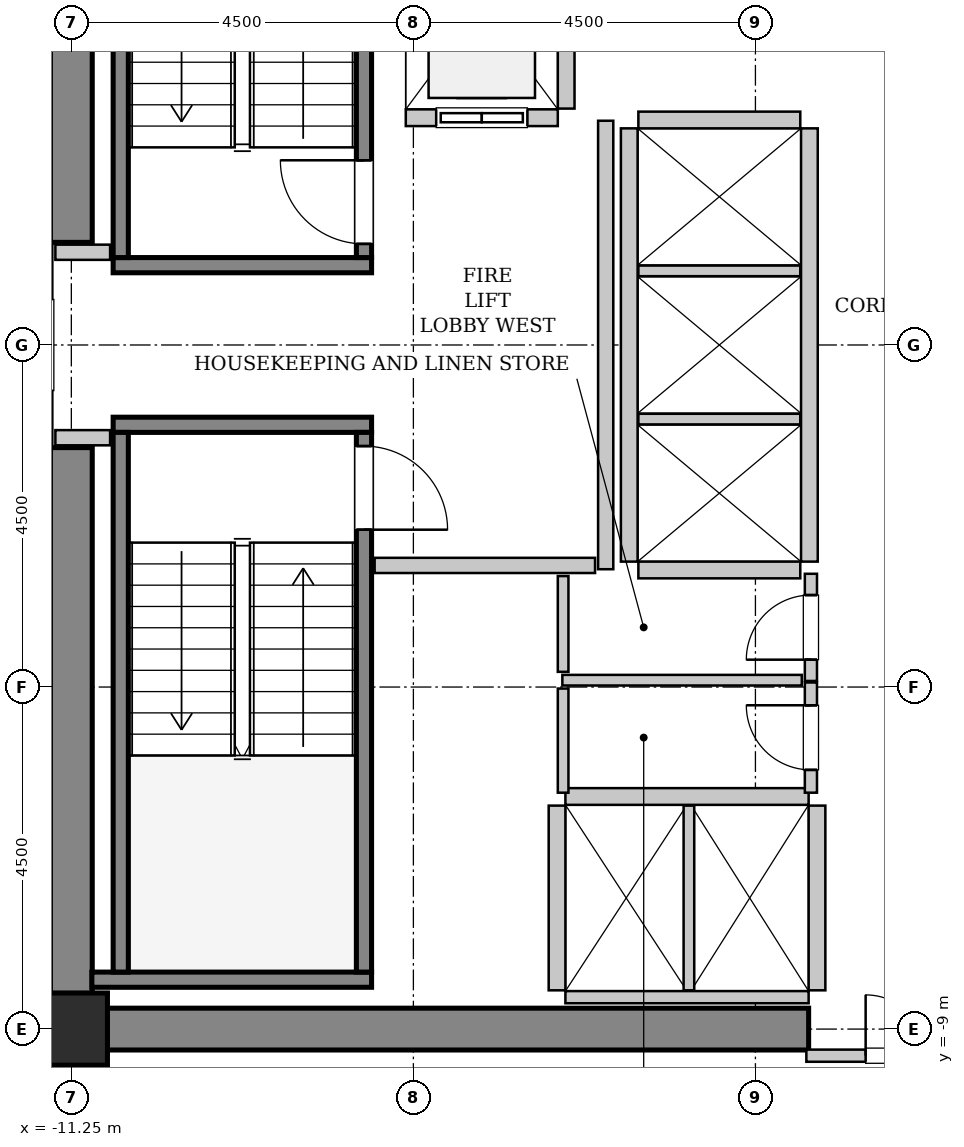
"""IFC4 building model, lengths in metres.
Left out: names, types, materials, properties, quantities, classifications, styles, units other than length and angle.
Written with IfcOpenShell. Run it as: python <this file> out.ifc"""

import sys

from ifc_helpers import new_model, si_unit, direction, frame, frame_2d, origin, origin_2d, place, context, subcontext, project, spatial, rectangle, hollow_rectangle, extrude, source, transform, mapped, element, fill, save


model = new_model("IFC4")
c1 = context("Model", 3, precision=1e-05, world=origin(), true_north=direction((0.0, 1.0)))
c2 = subcontext(c1, "Body", "Model", "MODEL_VIEW")
j1 = project(units=[si_unit("LENGTHUNIT", "METRE"), si_unit("PLANEANGLEUNIT", "RADIAN")], contexts=[c1])
p1 = place(None, origin())
s1 = spatial("IfcSite", under=j1, at=p1, CompositionType="ELEMENT")
p2 = place(p1, origin())
s2 = spatial("IfcBuilding", under=s1, at=p2, CompositionType="ELEMENT")
p3 = place(p2, frame((0.0, 0.0, 125.0)))
s3 = spatial("IfcBuildingStorey", under=s2, at=p3, CompositionType="ELEMENT", Elevation=125.0)
m1 = source(origin(), c2, "Body", "SweptSolid", [
    extrude(rectangle(XDim=9.975, YDim=0.55, at=frame_2d((4.987, 0.0))), origin(), (0.0, 0.0, 1.0), 3.8),
])
p4 = place(p3, frame((-11.525, -9.0, 0.0), z_axis=(0.0, 0.0, 1.0), x_axis=(1.0, 0.0, 0.0)))
e1 = element("IfcWall", 1, at=p4, inside=s3, PredefinedType="SHEAR", context=c2, shape_type="MappedRepresentation", body=[
    mapped(m1, transform((0.0, 0.0, 0.0), x_axis=(1.0, 0.0, 0.0), y_axis=(0.0, 1.0, 0.0), z_axis=(0.0, 0.0, 1.0), scale=1.0)),
])
m2 = source(origin(), c2, "Body", "SweptSolid", [
    extrude(rectangle(XDim=7.375, YDim=0.55, at=frame_2d((3.688, 0.0))), origin(), (0.0, 0.0, 1.0), 3.8),
])
for number, where, z_axis, x_axis in (
    (2, (-11.25, -8.725, 0.0), (0.0, 0.0, 1.0), (0.0, 1.0, 0.0)),
    (3, (-11.25, 1.35, 0.0), (0.0, 0.0, 1.0), (0.0, 1.0, 0.0)),
):
    element("IfcWall", number, at=place(p3, frame(where, z_axis=z_axis, x_axis=x_axis)), inside=s3, PredefinedType="SHEAR", context=c2, shape_type="MappedRepresentation", body=[
        mapped(m2, transform((0.0, 0.0, 0.0), x_axis=(1.0, 0.0, 0.0), y_axis=(0.0, 1.0, 0.0), z_axis=(0.0, 0.0, 1.0), scale=1.0)),
    ])
m3 = source(origin(), c2, "Body", "SweptSolid", [
    extrude(hollow_rectangle(XDim=0.95, YDim=0.95, WallThickness=0.045, InnerFilletRadius=0.045, OuterFilletRadius=0.09, at=origin_2d()), origin(), (0.0, 0.0, 1.0), 3.8),
])
p5 = place(p3, frame((-11.25, -9.0, 0.0), z_axis=(0.0, 0.0, 1.0), x_axis=(1.0, 0.0, 0.0)))
e4 = element("IfcColumn", 4, at=p5, inside=s3, PredefinedType="COLUMN", context=c2, shape_type="MappedRepresentation", body=[
    mapped(m3, transform((0.0, 0.0, 0.0), x_axis=(1.0, 0.0, 0.0), y_axis=(0.0, 1.0, 0.0), z_axis=(0.0, 0.0, 1.0), scale=1.0)),
])
m4 = source(origin(), c2, "Body", "SweptSolid", [
    extrude(rectangle(XDim=3.4, YDim=0.2, at=frame_2d((1.7, 0.0))), origin(), (0.0, 0.0, 1.0), 3.8),
])
p6 = place(p3, frame((-7.3, 1.05, 0.0), z_axis=(0.0, 0.0, 1.0), x_axis=(-1.0, 0.0, 0.0)))
e5 = element("IfcWall", 5, at=p6, inside=s3, PredefinedType="SOLIDWALL", context=c2, shape_type="MappedRepresentation", body=[
    mapped(m4, transform((0.0, 0.0, 0.0), x_axis=(1.0, 0.0, 0.0), y_axis=(0.0, 1.0, 0.0), z_axis=(0.0, 0.0, 1.0), scale=1.0)),
])
m5 = source(origin(), c2, "Body", "SweptSolid", [
    extrude(rectangle(XDim=7.1, YDim=0.2, at=frame_2d((3.55, 0.0))), origin(), (0.0, 0.0, 1.0), 3.8),
])
p7 = place(p3, frame((-7.4, 1.15, 0.0), z_axis=(0.0, 0.0, 1.0), x_axis=(0.0, 1.0, 0.0)))
e6 = element("IfcWall", 6, at=p7, inside=s3, PredefinedType="SOLIDWALL", context=c2, shape_type="MappedRepresentation", body=[
    mapped(m5, transform((0.0, 0.0, 0.0), x_axis=(1.0, 0.0, 0.0), y_axis=(0.0, 1.0, 0.0), z_axis=(0.0, 0.0, 1.0), scale=1.0)),
])
p8 = place(p7, frame((0.18, 0.0, 0.0)))
e7 = element("IfcOpeningElement", 7, at=p8, cuts=e6, PredefinedType="OPENING", context=c2, shape_type="SweptSolid", body=[
    extrude(rectangle(XDim=1.1, YDim=2.15, at=frame_2d((0.55, 1.075))), frame((0.0, 0.11, 0.0), z_axis=(0.0, -1.0, 0.0), x_axis=(1.0, 0.0, 0.0)), (0.0, 0.0, 1.0), 0.22),
])
p9 = place(p3, frame((-10.6, 1.15, 0.0), z_axis=(0.0, 0.0, 1.0), x_axis=(0.0, 1.0, 0.0)))
e8 = element("IfcWall", 8, at=p9, inside=s3, PredefinedType="SOLIDWALL", context=c2, shape_type="MappedRepresentation", body=[
    mapped(m5, transform((0.0, 0.0, 0.0), x_axis=(1.0, 0.0, 0.0), y_axis=(0.0, 1.0, 0.0), z_axis=(0.0, 0.0, 1.0), scale=1.0)),
])
p10 = place(p3, frame((-10.7, -1.05, 0.0), z_axis=(0.0, 0.0, 1.0), x_axis=(1.0, 0.0, 0.0)))
e9 = element("IfcWall", 9, at=p10, inside=s3, PredefinedType="SOLIDWALL", context=c2, shape_type="MappedRepresentation", body=[
    mapped(m4, transform((0.0, 0.0, 0.0), x_axis=(1.0, 0.0, 0.0), y_axis=(0.0, 1.0, 0.0), z_axis=(0.0, 0.0, 1.0), scale=1.0)),
])
m6 = source(origin(), c2, "Body", "SweptSolid", [
    extrude(rectangle(XDim=3.68, YDim=0.2, at=frame_2d((1.84, 0.0))), origin(), (0.0, 0.0, 1.0), 3.8),
])
p11 = place(p3, frame((-10.98, -8.35, 0.0), z_axis=(0.0, 0.0, 1.0), x_axis=(1.0, 0.0, 0.0)))
e10 = element("IfcWall", 10, at=p11, inside=s3, PredefinedType="SOLIDWALL", context=c2, shape_type="MappedRepresentation", body=[
    mapped(m6, transform((0.0, 0.0, 0.0), x_axis=(1.0, 0.0, 0.0), y_axis=(0.0, 1.0, 0.0), z_axis=(0.0, 0.0, 1.0), scale=1.0)),
])
p12 = place(p3, frame((-10.6, -1.15, 0.0), z_axis=(0.0, 0.0, 1.0), x_axis=(0.0, -1.0, 0.0)))
e11 = element("IfcWall", 11, at=p12, inside=s3, PredefinedType="SOLIDWALL", context=c2, shape_type="MappedRepresentation", body=[
    mapped(m5, transform((0.0, 0.0, 0.0), x_axis=(1.0, 0.0, 0.0), y_axis=(0.0, 1.0, 0.0), z_axis=(0.0, 0.0, 1.0), scale=1.0)),
])
p13 = place(p3, frame((-7.4, -1.15, 0.0), z_axis=(0.0, 0.0, 1.0), x_axis=(0.0, -1.0, 0.0)))
e12 = element("IfcWall", 12, at=p13, inside=s3, PredefinedType="SOLIDWALL", context=c2, shape_type="MappedRepresentation", body=[
    mapped(m5, transform((0.0, 0.0, 0.0), x_axis=(1.0, 0.0, 0.0), y_axis=(0.0, 1.0, 0.0), z_axis=(0.0, 0.0, 1.0), scale=1.0)),
])
p14 = place(p13, frame((0.18, 0.0, 0.0)))
e13 = element("IfcOpeningElement", 13, at=p14, cuts=e12, PredefinedType="OPENING", context=c2, shape_type="SweptSolid", body=[
    extrude(rectangle(XDim=1.1, YDim=2.15, at=frame_2d((0.55, 1.075))), frame((0.0, 0.11, 0.0), z_axis=(0.0, -1.0, 0.0), x_axis=(1.0, 0.0, 0.0)), (0.0, 0.0, 1.0), 0.22),
])
m7 = source(origin(), c2, "Body", "SweptSolid", [
    extrude(rectangle(XDim=2.0, YDim=0.22, at=frame_2d((1.0, 0.0))), origin(), (0.0, 0.0, 1.0), 3.535),
])
p15 = place(p3, frame((-6.85, 2.99, 0.0), z_axis=(0.0, 0.0, 1.0), x_axis=(1.0, 0.0, 0.0)))
e14 = element("IfcWall", 14, at=p15, inside=s3, PredefinedType="SOLIDWALL", context=c2, shape_type="MappedRepresentation", body=[
    mapped(m7, transform((0.0, 0.0, 0.0), x_axis=(1.0, 0.0, 0.0), y_axis=(0.0, 1.0, 0.0), z_axis=(0.0, 0.0, 1.0), scale=1.0)),
])
p16 = place(p15, frame((0.4, 0.0, 0.0)))
e15 = element("IfcOpeningElement", 15, at=p16, cuts=e14, PredefinedType="OPENING", context=c2, shape_type="SweptSolid", body=[
    extrude(rectangle(XDim=1.2, YDim=2.2, at=frame_2d((0.6, 1.1))), frame((0.0, 0.12, 0.0), z_axis=(0.0, -1.0, 0.0), x_axis=(1.0, 0.0, 0.0)), (0.0, 0.0, 1.0), 0.24),
])
m8 = source(origin(), c2, "Body", "SweptSolid", [
    extrude(rectangle(XDim=2.68, YDim=0.22, at=frame_2d((1.34, 0.0))), origin(), (0.0, 0.0, 1.0), 3.535),
])
p17 = place(p3, frame((-4.74, 3.11, 0.0), z_axis=(0.0, 0.0, 1.0), x_axis=(0.0, 1.0, 0.0)))
e16 = element("IfcWall", 16, at=p17, inside=s3, PredefinedType="SOLIDWALL", context=c2, shape_type="MappedRepresentation", body=[
    mapped(m8, transform((0.0, 0.0, 0.0), x_axis=(1.0, 0.0, 0.0), y_axis=(0.0, 1.0, 0.0), z_axis=(0.0, 0.0, 1.0), scale=1.0)),
])
m9 = source(origin(), c2, "Body", "SweptSolid", [
    extrude(rectangle(XDim=3.2, YDim=0.22, at=frame_2d((1.6, 0.0))), origin(), (0.0, 0.0, 1.0), 3.535),
])
p18 = place(p3, frame((-1.55, -5.94, 0.0), z_axis=(0.0, 0.0, 1.0), x_axis=(-1.0, 0.0, 0.0)))
e17 = element("IfcWall", 17, at=p18, inside=s3, PredefinedType="SOLIDWALL", context=c2, shape_type="MappedRepresentation", body=[
    mapped(m9, transform((0.0, 0.0, 0.0), x_axis=(1.0, 0.0, 0.0), y_axis=(0.0, 1.0, 0.0), z_axis=(0.0, 0.0, 1.0), scale=1.0)),
])
m10 = source(origin(), c2, "Body", "SweptSolid", [
    extrude(rectangle(XDim=3.2, YDim=0.16, at=frame_2d((1.6, 0.0))), origin(), (0.0, 0.0, 1.0), 2.425),
])
p19 = place(p3, frame((-4.75, -8.58, 0.0), z_axis=(0.0, 0.0, 1.0), x_axis=(1.0, 0.0, 0.0)))
e18 = element("IfcWall", 18, at=p19, inside=s3, PredefinedType="PARTITIONING", context=c2, shape_type="MappedRepresentation", body=[
    mapped(m10, transform((0.0, 0.0, 0.0), x_axis=(1.0, 0.0, 0.0), y_axis=(0.0, 1.0, 0.0), z_axis=(0.0, 0.0, 1.0), scale=1.0)),
])
m11 = source(origin(), c2, "Body", "SweptSolid", [
    extrude(rectangle(XDim=2.43, YDim=0.22, at=frame_2d((1.215, 0.0))), origin(), (0.0, 0.0, 1.0), 3.535),
])
p20 = place(p3, frame((-4.86, -6.06, 0.0), z_axis=(0.0, 0.0, 1.0), x_axis=(0.0, -1.0, 0.0)))
e19 = element("IfcWall", 19, at=p20, inside=s3, PredefinedType="SOLIDWALL", context=c2, shape_type="MappedRepresentation", body=[
    mapped(m11, transform((0.0, 0.0, 0.0), x_axis=(1.0, 0.0, 0.0), y_axis=(0.0, 1.0, 0.0), z_axis=(0.0, 0.0, 1.0), scale=1.0)),
])
m12 = source(origin(), c2, "Body", "SweptSolid", [
    extrude(rectangle(XDim=2.43, YDim=0.14, at=frame_2d((1.215, 0.0))), origin(), (0.0, 0.0, 1.0), 3.535),
])
p21 = place(p3, frame((-3.125, -8.49, 0.0), z_axis=(0.0, 0.0, 1.0), x_axis=(0.0, 1.0, 0.0)))
e20 = element("IfcWall", 20, at=p21, inside=s3, PredefinedType="PARTITIONING", context=c2, shape_type="MappedRepresentation", body=[
    mapped(m12, transform((0.0, 0.0, 0.0), x_axis=(1.0, 0.0, 0.0), y_axis=(0.0, 1.0, 0.0), z_axis=(0.0, 0.0, 1.0), scale=1.0)),
])
p22 = place(p3, frame((-1.44, -8.49, 0.0), z_axis=(0.0, 0.0, 1.0), x_axis=(0.0, 1.0, 0.0)))
e21 = element("IfcWall", 21, at=p22, inside=s3, PredefinedType="SOLIDWALL", context=c2, shape_type="MappedRepresentation", body=[
    mapped(m11, transform((0.0, 0.0, 0.0), x_axis=(1.0, 0.0, 0.0), y_axis=(0.0, 1.0, 0.0), z_axis=(0.0, 0.0, 1.0), scale=1.0)),
])
m13 = source(origin(), c2, "Body", "SweptSolid", [
    extrude(rectangle(XDim=5.7, YDim=0.22, at=frame_2d((2.85, 0.0))), origin(), (0.0, 0.0, 1.0), 3.535),
])
for number, where, z_axis, x_axis in (
    (22, (-1.54, -2.85, 0.0), (0.0, 0.0, 1.0), (0.0, 1.0, 0.0)),
    (23, (-3.91, 2.85, 0.0), (0.0, 0.0, 1.0), (0.0, -1.0, 0.0)),
):
    element("IfcWall", number, at=place(p3, frame(where, z_axis=z_axis, x_axis=x_axis)), inside=s3, PredefinedType="SOLIDWALL", context=c2, shape_type="MappedRepresentation", body=[
        mapped(m13, transform((0.0, 0.0, 0.0), x_axis=(1.0, 0.0, 0.0), y_axis=(0.0, 1.0, 0.0), z_axis=(0.0, 0.0, 1.0), scale=1.0)),
    ])
m14 = source(origin(), c2, "Body", "SweptSolid", [
    extrude(rectangle(XDim=2.13, YDim=0.22, at=frame_2d((1.065, 0.0))), origin(), (0.0, 0.0, 1.0), 3.535),
])
p23 = place(p3, frame((-3.79, -2.96, 0.0), z_axis=(0.0, 0.0, 1.0), x_axis=(1.0, 0.0, 0.0)))
e24 = element("IfcWall", 24, at=p23, inside=s3, PredefinedType="SOLIDWALL", context=c2, shape_type="MappedRepresentation", body=[
    mapped(m14, transform((0.0, 0.0, 0.0), x_axis=(1.0, 0.0, 0.0), y_axis=(0.0, 1.0, 0.0), z_axis=(0.0, 0.0, 1.0), scale=1.0)),
])
m15 = source(origin(), c2, "Body", "SweptSolid", [
    extrude(rectangle(XDim=2.13, YDim=0.14, at=frame_2d((1.065, 0.0))), origin(), (0.0, 0.0, 1.0), 3.535),
])
for number, where, z_axis, x_axis in (
    (25, (-3.79, -0.975, 0.0), (0.0, 0.0, 1.0), (1.0, 0.0, 0.0)),
    (26, (-3.79, 0.975, 0.0), (0.0, 0.0, 1.0), (1.0, 0.0, 0.0)),
):
    element("IfcWall", number, at=place(p3, frame(where, z_axis=z_axis, x_axis=x_axis)), inside=s3, PredefinedType="PARTITIONING", context=c2, shape_type="MappedRepresentation", body=[
        mapped(m15, transform((0.0, 0.0, 0.0), x_axis=(1.0, 0.0, 0.0), y_axis=(0.0, 1.0, 0.0), z_axis=(0.0, 0.0, 1.0), scale=1.0)),
    ])
p24 = place(p3, frame((-1.66, 2.96, 0.0), z_axis=(0.0, 0.0, 1.0), x_axis=(-1.0, 0.0, 0.0)))
e27 = element("IfcWall", 27, at=p24, inside=s3, PredefinedType="SOLIDWALL", context=c2, shape_type="MappedRepresentation", body=[
    mapped(m14, transform((0.0, 0.0, 0.0), x_axis=(1.0, 0.0, 0.0), y_axis=(0.0, 1.0, 0.0), z_axis=(0.0, 0.0, 1.0), scale=1.0)),
])
m16 = source(origin(), c2, "Body", "SweptSolid", [
    extrude(rectangle(XDim=5.9, YDim=0.2, at=frame_2d((2.95, 0.0))), origin(), (0.0, 0.0, 1.0), 3.535),
])
p25 = place(p3, frame((-4.22, -2.95, 0.0), z_axis=(0.0, 0.0, 1.0), x_axis=(0.0, 1.0, 0.0)))
e28 = element("IfcWall", 28, at=p25, inside=s3, PredefinedType="PARTITIONING", context=c2, shape_type="MappedRepresentation", body=[
    mapped(m16, transform((0.0, 0.0, 0.0), x_axis=(1.0, 0.0, 0.0), y_axis=(0.0, 1.0, 0.0), z_axis=(0.0, 0.0, 1.0), scale=1.0)),
])
m17 = source(origin(), c2, "Body", "SweptSolid", [
    extrude(rectangle(XDim=2.9, YDim=0.2, at=frame_2d((1.45, 0.0))), origin(), (0.0, 0.0, 1.0), 3.535),
])
p26 = place(p3, frame((-7.26, -2.9, 0.0), z_axis=(0.0, 0.0, 1.0), x_axis=(1.0, 0.0, 0.0)))
e29 = element("IfcWall", 29, at=p26, inside=s3, PredefinedType="PARTITIONING", context=c2, shape_type="MappedRepresentation", body=[
    mapped(m17, transform((0.0, 0.0, 0.0), x_axis=(1.0, 0.0, 0.0), y_axis=(0.0, 1.0, 0.0), z_axis=(0.0, 0.0, 1.0), scale=1.0)),
])
m18 = source(origin(), c2, "Body", "SweptSolid", [
    extrude(rectangle(XDim=0.72, YDim=0.2, at=frame_2d((0.36, 0.0))), origin(), (0.0, 0.0, 1.0), 3.535),
])
for number, where, z_axis, x_axis in (
    (30, (-11.46, 1.22, 0.0), (0.0, 0.0, 1.0), (1.0, 0.0, 0.0)),
    (31, (-11.46, -1.22, 0.0), (0.0, 0.0, 1.0), (1.0, 0.0, 0.0)),
):
    element("IfcWall", number, at=place(p3, frame(where, z_axis=z_axis, x_axis=x_axis)), inside=s3, PredefinedType="PARTITIONING", context=c2, shape_type="MappedRepresentation", body=[
        mapped(m18, transform((0.0, 0.0, 0.0), x_axis=(1.0, 0.0, 0.0), y_axis=(0.0, 1.0, 0.0), z_axis=(0.0, 0.0, 1.0), scale=1.0)),
    ])
m19 = source(origin(), c2, "Body", "SweptSolid", [
    extrude(rectangle(XDim=3.16, YDim=0.16, at=frame_2d((1.58, 0.0))), origin(), (0.0, 0.0, 1.0), 2.425),
])
p27 = place(p3, frame((-1.58, -9.35, 0.0), z_axis=(0.0, 0.0, 1.0), x_axis=(1.0, 0.0, 0.0)))
e32 = element("IfcWall", 32, at=p27, inside=s3, PredefinedType="PARTITIONING", context=c2, shape_type="MappedRepresentation", body=[
    mapped(m19, transform((0.0, 0.0, 0.0), x_axis=(1.0, 0.0, 0.0), y_axis=(0.0, 1.0, 0.0), z_axis=(0.0, 0.0, 1.0), scale=1.0)),
])
p28 = place(p27, frame((0.78, 0.0, 0.0)))
e33 = element("IfcOpeningElement", 33, at=p28, cuts=e32, PredefinedType="OPENING", context=c2, shape_type="SweptSolid", body=[
    extrude(rectangle(XDim=1.6, YDim=2.3, at=frame_2d((0.8, 1.15))), frame((0.0, 0.09, 0.0), z_axis=(0.0, -1.0, 0.0), x_axis=(1.0, 0.0, 0.0)), (0.0, 0.0, 1.0), 0.18),
])
m20 = source(origin(), c2, "Body", "SweptSolid", [
    extrude(rectangle(XDim=1.41, YDim=0.16, at=frame_2d((0.705, 0.0))), origin(), (0.0, 0.0, 1.0), 3.535),
])
p29 = place(p3, frame((-1.52, -4.42, 0.0), z_axis=(0.0, 0.0, 1.0), x_axis=(0.0, 1.0, 0.0)))
e34 = element("IfcWall", 34, at=p29, inside=s3, PredefinedType="PARTITIONING", context=c2, shape_type="MappedRepresentation", body=[
    mapped(m20, transform((0.0, 0.0, 0.0), x_axis=(1.0, 0.0, 0.0), y_axis=(0.0, 1.0, 0.0), z_axis=(0.0, 0.0, 1.0), scale=1.0)),
])
p30 = place(p29, frame((0.28, 0.0, 0.0)))
e35 = element("IfcOpeningElement", 35, at=p30, cuts=e34, PredefinedType="OPENING", context=c2, shape_type="SweptSolid", body=[
    extrude(rectangle(XDim=0.85, YDim=2.1, at=frame_2d((0.425, 1.05))), frame((0.0, 0.09, 0.0), z_axis=(0.0, -1.0, 0.0), x_axis=(1.0, 0.0, 0.0)), (0.0, 0.0, 1.0), 0.18),
])
m21 = source(origin(), c2, "Body", "SweptSolid", [
    extrude(rectangle(XDim=3.15, YDim=0.14, at=frame_2d((1.575, 0.0))), origin(), (0.0, 0.0, 1.0), 3.535),
])
p31 = place(p3, frame((-4.79, -4.41, 0.0), z_axis=(0.0, 0.0, 1.0), x_axis=(1.0, 0.0, 0.0)))
e36 = element("IfcWall", 36, at=p31, inside=s3, PredefinedType="PARTITIONING", context=c2, shape_type="MappedRepresentation", body=[
    mapped(m21, transform((0.0, 0.0, 0.0), x_axis=(1.0, 0.0, 0.0), y_axis=(0.0, 1.0, 0.0), z_axis=(0.0, 0.0, 1.0), scale=1.0)),
])
m22 = source(origin(), c2, "Body", "SweptSolid", [
    extrude(rectangle(XDim=1.26, YDim=0.14, at=frame_2d((0.63, 0.0))), origin(), (0.0, 0.0, 1.0), 3.535),
])
p32 = place(p3, frame((-4.78, -4.3, 0.0), z_axis=(0.0, 0.0, 1.0), x_axis=(0.0, 1.0, 0.0)))
e37 = element("IfcWall", 37, at=p32, inside=s3, PredefinedType="PARTITIONING", context=c2, shape_type="MappedRepresentation", body=[
    mapped(m22, transform((0.0, 0.0, 0.0), x_axis=(1.0, 0.0, 0.0), y_axis=(0.0, 1.0, 0.0), z_axis=(0.0, 0.0, 1.0), scale=1.0)),
])
m23 = source(origin(), c2, "Body", "SweptSolid", [
    extrude(rectangle(XDim=1.45, YDim=0.16, at=frame_2d((0.725, 0.0))), origin(), (0.0, 0.0, 1.0), 3.535),
])
p33 = place(p3, frame((-1.52, -5.89, 0.0), z_axis=(0.0, 0.0, 1.0), x_axis=(0.0, 1.0, 0.0)))
e38 = element("IfcWall", 38, at=p33, inside=s3, PredefinedType="PARTITIONING", context=c2, shape_type="MappedRepresentation", body=[
    mapped(m23, transform((0.0, 0.0, 0.0), x_axis=(1.0, 0.0, 0.0), y_axis=(0.0, 1.0, 0.0), z_axis=(0.0, 0.0, 1.0), scale=1.0)),
])
p34 = place(p33, frame((0.3, 0.0, 0.0)))
e39 = element("IfcOpeningElement", 39, at=p34, cuts=e38, PredefinedType="OPENING", context=c2, shape_type="SweptSolid", body=[
    extrude(rectangle(XDim=0.85, YDim=2.1, at=frame_2d((0.425, 1.05))), frame((0.0, 0.09, 0.0), z_axis=(0.0, -1.0, 0.0), x_axis=(1.0, 0.0, 0.0)), (0.0, 0.0, 1.0), 0.18),
])
m24 = source(origin(), c2, "Body", "SweptSolid", [
    extrude(rectangle(XDim=1.37, YDim=0.14, at=frame_2d((0.685, 0.0))), origin(), (0.0, 0.0, 1.0), 3.535),
])
p35 = place(p3, frame((-4.78, -5.89, 0.0), z_axis=(0.0, 0.0, 1.0), x_axis=(0.0, 1.0, 0.0)))
e40 = element("IfcWall", 40, at=p35, inside=s3, PredefinedType="PARTITIONING", context=c2, shape_type="MappedRepresentation", body=[
    mapped(m24, transform((0.0, 0.0, 0.0), x_axis=(1.0, 0.0, 0.0), y_axis=(0.0, 1.0, 0.0), z_axis=(0.0, 0.0, 1.0), scale=1.0)),
])
m25 = source(origin(), c2, "Body", "SweptSolid", [
    extrude(rectangle(XDim=1.1, YDim=2.15, at=frame_2d((0.55, 1.075))), frame((0.0, 0.025, 0.0), z_axis=(0.0, -1.0, 0.0), x_axis=(1.0, 0.0, 0.0)), (0.0, 0.0, 1.0), 0.05),
])
p36 = place(p8, origin())
e41 = element("IfcDoor", 41, at=p36, inside=s3, OperationType="SINGLE_SWING_RIGHT", PredefinedType="DOOR", context=c2, shape_type="MappedRepresentation", body=[
    mapped(m25, transform((0.0, 0.0, 0.0), x_axis=(1.0, 0.0, 0.0), y_axis=(0.0, 1.0, 0.0), z_axis=(0.0, 0.0, 1.0), scale=1.0)),
])
fill(e7, e41)
p37 = place(p14, origin())
e42 = element("IfcDoor", 42, at=p37, inside=s3, OperationType="SINGLE_SWING_RIGHT", PredefinedType="DOOR", context=c2, shape_type="MappedRepresentation", body=[
    mapped(m25, transform((0.0, 0.0, 0.0), x_axis=(1.0, 0.0, 0.0), y_axis=(0.0, 1.0, 0.0), z_axis=(0.0, 0.0, 1.0), scale=1.0)),
])
fill(e13, e42)
m26 = source(origin(), c2, "Body", "SweptSolid", [
    extrude(rectangle(XDim=1.2, YDim=2.2, at=frame_2d((0.6, 1.1))), frame((0.0, 0.025, 0.0), z_axis=(0.0, -1.0, 0.0), x_axis=(1.0, 0.0, 0.0)), (0.0, 0.0, 1.0), 0.05),
])
p38 = place(p16, origin())
e43 = element("IfcDoor", 43, at=p38, inside=s3, OperationType="SLIDING_TO_LEFT", PredefinedType="DOOR", context=c2, shape_type="MappedRepresentation", body=[
    mapped(m26, transform((0.0, 0.0, 0.0), x_axis=(1.0, 0.0, 0.0), y_axis=(0.0, 1.0, 0.0), z_axis=(0.0, 0.0, 1.0), scale=1.0)),
])
fill(e15, e43)
m27 = source(origin(), c2, "Body", "SweptSolid", [
    extrude(rectangle(XDim=1.6, YDim=2.3, at=frame_2d((0.8, 1.15))), frame((0.0, 0.025, 0.0), z_axis=(0.0, -1.0, 0.0), x_axis=(1.0, 0.0, 0.0)), (0.0, 0.0, 1.0), 0.05),
])
p39 = place(p28, origin())
e44 = element("IfcDoor", 44, at=p39, inside=s3, OperationType="DOUBLE_DOOR_SINGLE_SWING", PredefinedType="DOOR", context=c2, shape_type="MappedRepresentation", body=[
    mapped(m27, transform((0.0, 0.0, 0.0), x_axis=(1.0, 0.0, 0.0), y_axis=(0.0, 1.0, 0.0), z_axis=(0.0, 0.0, 1.0), scale=1.0)),
])
fill(e33, e44)
m28 = source(origin(), c2, "Body", "SweptSolid", [
    extrude(rectangle(XDim=0.85, YDim=2.1, at=frame_2d((0.425, 1.05))), frame((0.0, 0.025, 0.0), z_axis=(0.0, -1.0, 0.0), x_axis=(1.0, 0.0, 0.0)), (0.0, 0.0, 1.0), 0.05),
])
p40 = place(p30, origin())
e45 = element("IfcDoor", 45, at=p40, inside=s3, OperationType="SINGLE_SWING_LEFT", PredefinedType="DOOR", context=c2, shape_type="MappedRepresentation", body=[
    mapped(m28, transform((0.0, 0.0, 0.0), x_axis=(1.0, 0.0, 0.0), y_axis=(0.0, 1.0, 0.0), z_axis=(0.0, 0.0, 1.0), scale=1.0)),
])
fill(e35, e45)
p41 = place(p34, origin())
e46 = element("IfcDoor", 46, at=p41, inside=s3, OperationType="SINGLE_SWING_RIGHT", PredefinedType="DOOR", context=c2, shape_type="MappedRepresentation", body=[
    mapped(m28, transform((0.0, 0.0, 0.0), x_axis=(1.0, 0.0, 0.0), y_axis=(0.0, 1.0, 0.0), z_axis=(0.0, 0.0, 1.0), scale=1.0)),
])
fill(e39, e46)
save(model, sys.argv[1])
